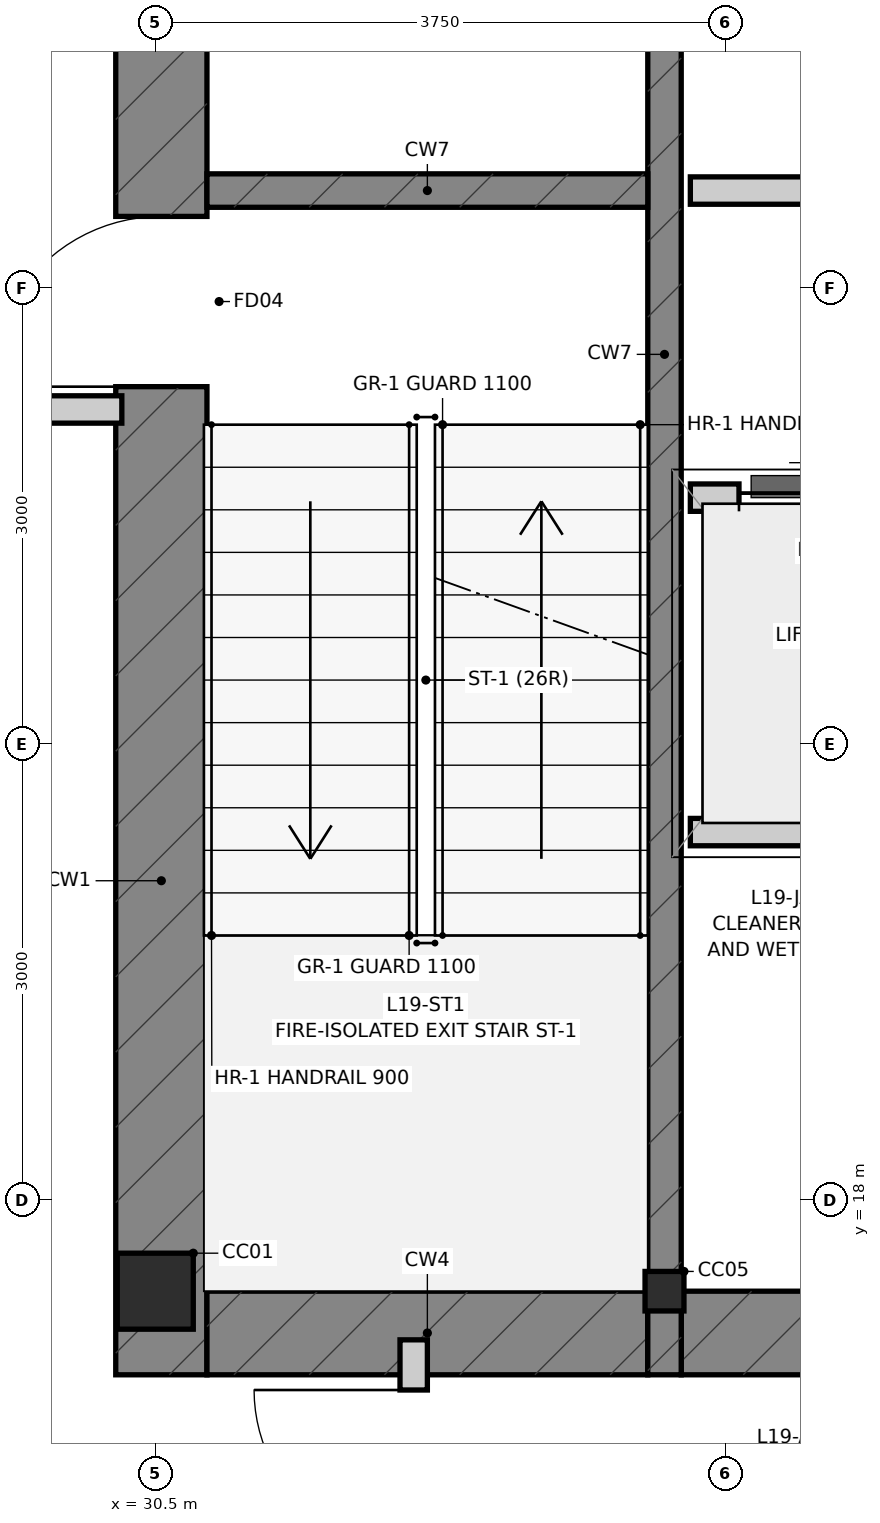
"""IFC4 building model, lengths in metres.
Left out: names, types, materials, properties, quantities, classifications, styles, units other than length and angle.
Written with IfcOpenShell. Run it as: python <this file> out.ifc"""

import sys

from ifc_helpers import new_model, si_unit, direction, frame, frame_2d, origin, origin_2d, place, context, subcontext, project, spatial, rectangle, i_section, extrude, source, transform, mapped, element, fill, save


model = new_model("IFC4")
c1 = context("Model", 3, precision=1e-05, world=origin(), true_north=direction((0.0, 1.0)))
c2 = subcontext(c1, "Body", "Model", "MODEL_VIEW")
j1 = project(units=[si_unit("LENGTHUNIT", "METRE"), si_unit("PLANEANGLEUNIT", "RADIAN")], contexts=[c1])
p1 = place(None, origin())
s1 = spatial("IfcSite", under=j1, at=p1, CompositionType="ELEMENT")
p2 = place(p1, origin())
s2 = spatial("IfcBuilding", under=s1, at=p2, CompositionType="ELEMENT")
p3 = place(p2, frame((0.0, 0.0, 75.05)))
s3 = spatial("IfcBuildingStorey", under=s2, at=p3, CompositionType="ELEMENT", Elevation=75.05)
m1 = source(origin(), c2, "Body", "SweptSolid", [
    extrude(i_section(OverallWidth=0.5, OverallDepth=0.5, WebThickness=0.028, FlangeThickness=0.04, at=origin_2d()), origin(), (0.0, 0.0, 1.0), 4.8),
])
p4 = place(p3, frame((30.5, 17.4, 0.0), z_axis=(0.0, 0.0, 1.0), x_axis=(1.0, 0.0, 0.0)))
e1 = element("IfcColumn", 1, at=p4, inside=s3, PredefinedType="COLUMN", context=c2, shape_type="MappedRepresentation", body=[
    mapped(m1, transform((0.0, 0.0, 0.0), scale=1.0)),
])
m2 = source(origin(), c2, "Body", "SweptSolid", [
    extrude(i_section(OverallWidth=0.256, OverallDepth=0.26, WebThickness=0.01, FlangeThickness=0.017, at=origin_2d()), origin(), (0.0, 0.0, 1.0), 4.8),
])
p5 = place(p3, frame((33.85, 17.4, 0.0), z_axis=(0.0, 0.0, 1.0), x_axis=(1.0, 0.0, 0.0)))
e2 = element("IfcColumn", 2, at=p5, inside=s3, PredefinedType="COLUMN", context=c2, shape_type="MappedRepresentation", body=[
    mapped(m2, transform((0.0, 0.0, 0.0), scale=1.0)),
])
p6 = place(p3, frame((30.54, 16.85, 0.0), z_axis=(0.0, 0.0, 1.0), x_axis=(0.0, 1.0, 0.0)))
e3 = element("IfcWall", 3, at=p6, inside=s3, PredefinedType="SHEAR", context=c2, shape_type="SweptSolid", body=[
    extrude(rectangle(XDim=13.425, YDim=0.6, at=frame_2d((6.712, 0.0))), origin(), (0.0, 0.0, 1.0), 4.8),
])
p7 = place(p6, frame((6.5, 0.0, 0.0)))
e4 = element("IfcOpeningElement", 4, at=p7, cuts=e3, PredefinedType="OPENING", context=c2, shape_type="SweptSolid", body=[
    extrude(rectangle(XDim=1.12, YDim=2.15, at=frame_2d((0.56, 1.075))), frame((0.0, 0.312, 0.0), z_axis=(0.0, -1.0, 0.0), x_axis=(1.0, 0.0, 0.0)), (0.0, 0.0, 1.0), 0.624),
])
p8 = place(p6, frame((10.95, 0.0, 0.0)))
e5 = element("IfcOpeningElement", 5, at=p8, cuts=e3, PredefinedType="OPENING", context=c2, shape_type="SweptSolid", body=[
    extrude(rectangle(XDim=1.2, YDim=2.2, at=frame_2d((0.6, 1.1))), frame((0.0, 0.312, 0.0), z_axis=(0.0, -1.0, 0.0), x_axis=(1.0, 0.0, 0.0)), (0.0, 0.0, 1.0), 0.624),
])
p9 = place(p3, frame((30.84, 17.125, 0.0), z_axis=(0.0, 0.0, 1.0), x_axis=(1.0, 0.0, 0.0)))
e6 = element("IfcWall", 6, at=p9, inside=s3, PredefinedType="SHEAR", context=c2, shape_type="SweptSolid", body=[
    extrude(rectangle(XDim=2.9, YDim=0.55, at=frame_2d((1.45, 0.0))), origin(), (0.0, 0.0, 1.0), 4.8),
])
p10 = place(p3, frame((33.96, 17.125, 0.0), z_axis=(0.0, 0.0, 1.0), x_axis=(1.0, 0.0, 0.0)))
e7 = element("IfcWall", 7, at=p10, inside=s3, PredefinedType="SHEAR", context=c2, shape_type="SweptSolid", body=[
    extrude(rectangle(XDim=8.08, YDim=0.55, at=frame_2d((4.04, 0.0))), origin(), (0.0, 0.0, 1.0), 4.8),
])
p11 = place(p3, frame((33.85, 16.85, 0.0), z_axis=(0.0, 0.0, 1.0), x_axis=(0.0, 1.0, 0.0)))
e8 = element("IfcWall", 8, at=p11, inside=s3, PredefinedType="SHEAR", context=c2, shape_type="SweptSolid", body=[
    extrude(rectangle(XDim=13.425, YDim=0.22, at=frame_2d((6.712, 0.0))), origin(), (0.0, 0.0, 1.0), 4.8),
])
p12 = place(p3, frame((30.84, 24.64, 0.0), z_axis=(0.0, 0.0, 1.0), x_axis=(1.0, 0.0, 0.0)))
e9 = element("IfcWall", 9, at=p12, inside=s3, PredefinedType="SHEAR", context=c2, shape_type="SweptSolid", body=[
    extrude(rectangle(XDim=2.9, YDim=0.22, at=frame_2d((1.45, 0.0))), origin(), (0.0, 0.0, 1.0), 4.8),
])
p13 = place(p3, frame((34.02, 22.62, 0.0), z_axis=(0.0, 0.0, 1.0), x_axis=(1.0, 0.0, 0.0)))
e10 = element("IfcWall", 10, at=p13, inside=s3, PredefinedType="PARTITIONING", context=c2, shape_type="SweptSolid", body=[
    extrude(rectangle(XDim=3.6, YDim=0.18, at=frame_2d((1.8, 0.0))), origin(), (0.0, 0.0, 1.0), 4.55),
])
p14 = place(p13, frame((0.32, 0.0, 0.0)))
e11 = element("IfcOpeningElement", 11, at=p14, cuts=e10, PredefinedType="OPENING", context=c2, shape_type="SweptSolid", body=[
    extrude(rectangle(XDim=1.1, YDim=2.2, at=frame_2d((0.55, 1.1))), frame((0.0, 0.102, 0.0), z_axis=(0.0, -1.0, 0.0), x_axis=(1.0, 0.0, 0.0)), (0.0, 0.0, 1.0), 0.204),
])
p15 = place(p13, frame((2.12, 0.0, 0.0)))
e12 = element("IfcOpeningElement", 12, at=p15, cuts=e10, PredefinedType="OPENING", context=c2, shape_type="SweptSolid", body=[
    extrude(rectangle(XDim=1.1, YDim=2.2, at=frame_2d((0.55, 1.1))), frame((0.0, 0.102, 0.0), z_axis=(0.0, -1.0, 0.0), x_axis=(1.0, 0.0, 0.0)), (0.0, 0.0, 1.0), 0.204),
])
p16 = place(p3, frame((34.02, 24.64, 0.0), z_axis=(0.0, 0.0, 1.0), x_axis=(1.0, 0.0, 0.0)))
e13 = element("IfcWall", 13, at=p16, inside=s3, PredefinedType="PARTITIONING", context=c2, shape_type="SweptSolid", body=[
    extrude(rectangle(XDim=3.68, YDim=0.18, at=frame_2d((1.84, 0.0))), origin(), (0.0, 0.0, 1.0), 4.55),
])
p17 = place(p3, frame((27.065, 23.2, 0.0), z_axis=(0.0, 0.0, 1.0), x_axis=(1.0, 0.0, 0.0)))
e14 = element("IfcWall", 14, at=p17, inside=s3, PredefinedType="PARTITIONING", context=c2, shape_type="SweptSolid", body=[
    extrude(rectangle(XDim=3.215, YDim=0.18, at=frame_2d((1.607, 0.0))), origin(), (0.0, 0.0, 1.0), 4.55),
])
p18 = place(p17, frame((0.75, 0.0, 0.0)))
e15 = element("IfcOpeningElement", 15, at=p18, cuts=e14, PredefinedType="OPENING", context=c2, shape_type="SweptSolid", body=[
    extrude(rectangle(XDim=1.05, YDim=2.15, at=frame_2d((0.525, 1.075))), frame((0.0, 0.102, 0.0), z_axis=(0.0, -1.0, 0.0), x_axis=(1.0, 0.0, 0.0)), (0.0, 0.0, 1.0), 0.204),
])
p19 = place(p3, frame((34.02, 20.42, 0.0), z_axis=(0.0, 0.0, 1.0), x_axis=(1.0, 0.0, 0.0)))
e16 = element("IfcWall", 16, at=p19, inside=s3, PredefinedType="PARTITIONING", context=c2, shape_type="SweptSolid", body=[
    extrude(rectangle(XDim=3.64, YDim=0.18, at=frame_2d((1.82, 0.0))), origin(), (0.0, 0.0, 1.0), 4.55),
])
p20 = place(p3, frame((32.2, 15.45, 0.0), z_axis=(0.0, 0.0, 1.0), x_axis=(0.0, 1.0, 0.0)))
e17 = element("IfcWall", 17, at=p20, inside=s3, PredefinedType="PARTITIONING", context=c2, shape_type="SweptSolid", body=[
    extrude(rectangle(XDim=1.63, YDim=0.18, at=frame_2d((0.815, 0.0))), origin(), (0.0, 0.0, 1.0), 4.55),
])
p21 = place(p20, frame((0.25, 0.0, 0.0)))
e18 = element("IfcOpeningElement", 18, at=p21, cuts=e17, PredefinedType="OPENING", context=c2, shape_type="SweptSolid", body=[
    extrude(rectangle(XDim=1.05, YDim=2.15, at=frame_2d((0.525, 1.075))), frame((0.0, 0.102, 0.0), z_axis=(0.0, -1.0, 0.0), x_axis=(1.0, 0.0, 0.0)), (0.0, 0.0, 1.0), 0.204),
])
p22 = place(p7, origin())
e19 = element("IfcDoor", 19, at=p22, inside=s3, OperationType="SINGLE_SWING_LEFT", PredefinedType="DOOR", context=c2, shape_type="SweptSolid", body=[
    extrude(rectangle(XDim=1.12, YDim=2.15, at=frame_2d((0.56, 1.075))), frame((0.0, 0.025, 0.0), z_axis=(0.0, -1.0, 0.0), x_axis=(1.0, 0.0, 0.0)), (0.0, 0.0, 1.0), 0.05),
])
fill(e4, e19)
p23 = place(p14, origin())
e20 = element("IfcDoor", 20, at=p23, inside=s3, OperationType="SLIDING_TO_LEFT", PredefinedType="DOOR", context=c2, shape_type="SweptSolid", body=[
    extrude(rectangle(XDim=1.1, YDim=2.2, at=frame_2d((0.55, 1.1))), frame((0.0, 0.025, 0.0), z_axis=(0.0, -1.0, 0.0), x_axis=(1.0, 0.0, 0.0)), (0.0, 0.0, 1.0), 0.05),
])
fill(e11, e20)
p24 = place(p21, origin())
e21 = element("IfcDoor", 21, at=p24, inside=s3, OperationType="SINGLE_SWING_RIGHT", PredefinedType="DOOR", context=c2, shape_type="SweptSolid", body=[
    extrude(rectangle(XDim=1.05, YDim=2.15, at=frame_2d((0.525, 1.075))), frame((0.0, 0.025, 0.0), z_axis=(0.0, -1.0, 0.0), x_axis=(1.0, 0.0, 0.0)), (0.0, 0.0, 1.0), 0.05),
])
fill(e18, e21)
save(model, sys.argv[1])
